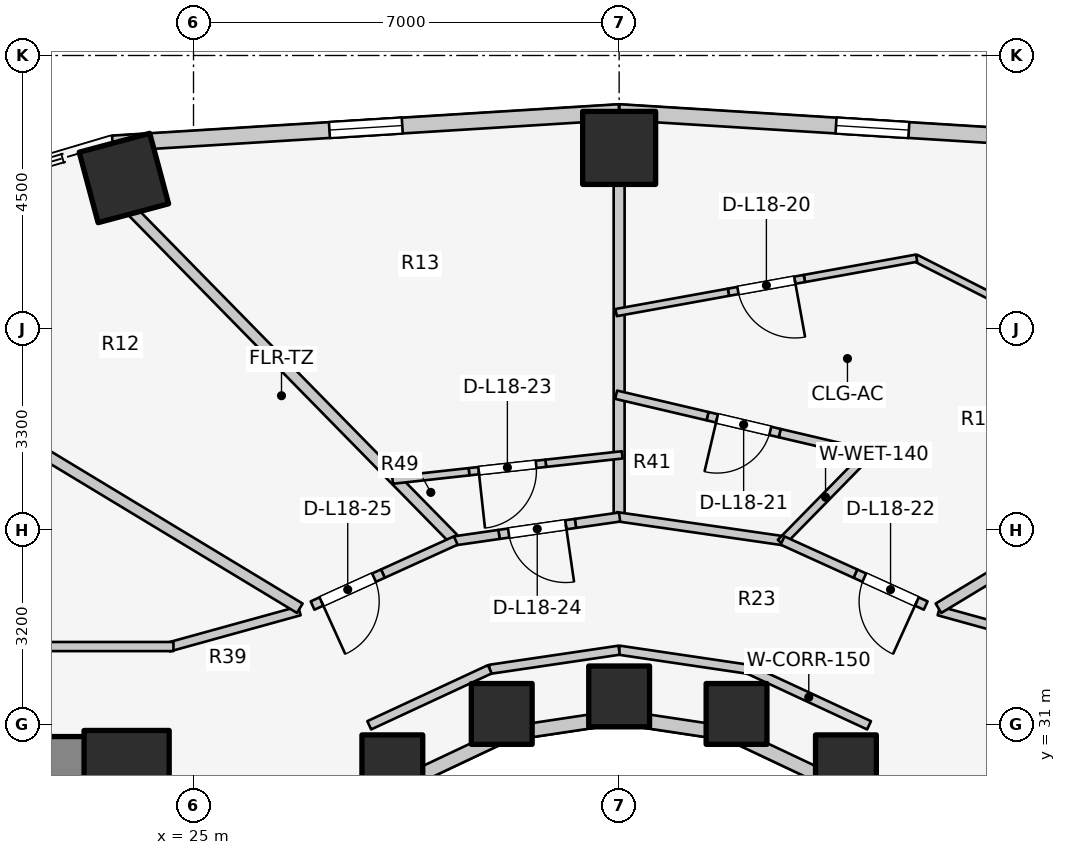
"""IFC4 building model, lengths in metres.
Left out: names, types, materials, properties, quantities, classifications, styles, units other than length and angle.
Written with IfcOpenShell. Run it as: python <this file> out.ifc"""

import sys

from ifc_helpers import new_model, si_unit, direction, frame, frame_2d, origin, origin_2d, place, context, subcontext, project, spatial, rectangle, extrude, element, fill, save


model = new_model("IFC4")
c1 = context("Model", 3, precision=1e-05, world=origin(), true_north=direction((0.0, 1.0)))
c2 = subcontext(c1, "Body", "Model", "MODEL_VIEW")
j1 = project(units=[si_unit("LENGTHUNIT", "METRE"), si_unit("PLANEANGLEUNIT", "RADIAN")], contexts=[c1])
p1 = place(None, origin())
s1 = spatial("IfcSite", under=j1, at=p1, CompositionType="ELEMENT")
p2 = place(p1, origin())
s2 = spatial("IfcBuilding", under=s1, at=p2, CompositionType="ELEMENT")
p3 = place(p2, frame((0.0, 0.0, 61.7)))
s3 = spatial("IfcBuildingStorey", under=s2, at=p3, CompositionType="ELEMENT", Elevation=61.7)
p4 = place(p3, frame((19.65, 30.35, 0.0), z_axis=(0.0, 0.0, 1.0), x_axis=(1.0, 0.0, 0.0)))
e1 = element("IfcWall", 1, at=p4, inside=s3, PredefinedType="SHEAR", context=c2, shape_type="SweptSolid", body=[
    extrude(rectangle(XDim=4.5, YDim=0.9, at=frame_2d((2.25, 0.0))), origin(), (0.0, 0.0, 1.0), 3.1),
])
p5 = place(p3, frame((23.9, 30.2, 0.0), z_axis=(0.0, 0.0, 1.0), x_axis=(1.0, 0.0, 0.0)))
e2 = element("IfcColumn", 2, at=p5, inside=s3, PredefinedType="COLUMN", context=c2, shape_type="SweptSolid", body=[
    extrude(rectangle(XDim=1.4, YDim=1.4, at=origin_2d()), origin(), (0.0, 0.0, 1.0), 3.1),
])
for number, where, z_axis, x_axis in (
    (3, (35.73, 30.327, 0.0), (0.0, 0.0, 1.0), (1.0, 0.0, 0.0)),
    (4, (33.931, 31.172, 0.0), (0.0, 0.0, 1.0), (1.0, 0.0, 0.0)),
    (5, (32.0, 31.46, 0.0), (0.0, 0.0, 1.0), (1.0, 0.0, 0.0)),
):
    element("IfcColumn", number, at=place(p3, frame(where, z_axis=z_axis, x_axis=x_axis)), inside=s3, PredefinedType="COLUMN", context=c2, shape_type="SweptSolid", body=[
        extrude(rectangle(XDim=1.0, YDim=1.0, at=origin_2d()), origin(), (0.0, 0.0, 1.0), 3.1),
    ])
p6 = place(p3, frame((32.0, 40.48, 0.0), z_axis=(0.0, 0.0, 1.0), x_axis=(0.0, 1.0, 0.0)))
e6 = element("IfcColumn", 6, at=p6, inside=s3, PredefinedType="COLUMN", context=c2, shape_type="SweptSolid", body=[
    extrude(rectangle(XDim=1.2, YDim=1.2, at=origin_2d()), origin(), (0.0, 0.0, 1.0), 3.1),
])
p7 = place(p3, frame((30.069, 31.172, 0.0), z_axis=(0.0, 0.0, 1.0), x_axis=(1.0, 0.0, 0.0)))
e7 = element("IfcColumn", 7, at=p7, inside=s3, PredefinedType="COLUMN", context=c2, shape_type="SweptSolid", body=[
    extrude(rectangle(XDim=1.0, YDim=1.0, at=origin_2d()), origin(), (0.0, 0.0, 1.0), 3.1),
])
p8 = place(p3, frame((23.855, 39.986, 0.0), z_axis=(0.0, 0.0, 1.0), x_axis=(-0.258819045103, 0.965925826289, 0.0)))
e8 = element("IfcColumn", 8, at=p8, inside=s3, PredefinedType="COLUMN", context=c2, shape_type="SweptSolid", body=[
    extrude(rectangle(XDim=1.2, YDim=1.2, at=origin_2d()), origin(), (0.0, 0.0, 1.0), 3.1),
])
p9 = place(p3, frame((28.27, 30.327, 0.0), z_axis=(0.0, 0.0, 1.0), x_axis=(1.0, 0.0, 0.0)))
e9 = element("IfcColumn", 9, at=p9, inside=s3, PredefinedType="COLUMN", context=c2, shape_type="SweptSolid", body=[
    extrude(rectangle(XDim=1.0, YDim=1.0, at=origin_2d()), origin(), (0.0, 0.0, 1.0), 3.1),
])
p10 = place(p3, frame((35.56, 30.032, 0.0), z_axis=(0.0, 0.0, 1.0), x_axis=(-0.904179699603, 0.427152280606, 0.0)))
e10 = element("IfcWall", 10, at=p10, inside=s3, PredefinedType="STANDARD", context=c2, shape_type="SweptSolid", body=[
    extrude(rectangle(XDim=1.899, YDim=0.23, at=frame_2d((0.95, 0.0))), origin(), (0.0, 0.0, 1.0), 1.22),
])
for number, where, z_axis, x_axis in (
    (11, (33.843, 30.843, 0.0), (0.0, 0.0, 1.0), (-0.989, 0.149, 0.0)),
    (12, (32.0, 31.12, 0.0), (0.0, 0.0, 1.0), (-0.989, -0.149, 0.0)),
):
    element("IfcWall", number, at=place(p3, frame(where, z_axis=z_axis, x_axis=x_axis)), inside=s3, PredefinedType="STANDARD", context=c2, shape_type="SweptSolid", body=[
        extrude(rectangle(XDim=1.864, YDim=0.23, at=frame_2d((0.932, 0.0))), origin(), (0.0, 0.0, 1.0), 1.22),
    ])
p11 = place(p3, frame((30.157, 30.843, 0.0), z_axis=(0.0, 0.0, 1.0), x_axis=(-0.904179699603, -0.427152280606, 0.0)))
e13 = element("IfcWall", 13, at=p11, inside=s3, PredefinedType="STANDARD", context=c2, shape_type="SweptSolid", body=[
    extrude(rectangle(XDim=1.899, YDim=0.23, at=frame_2d((0.95, 0.0))), origin(), (0.0, 0.0, 1.0), 1.22),
])
p12 = place(p3, frame((40.332, 40.553, 0.0), z_axis=(0.0, 0.0, 1.0), x_axis=(-0.998090514779, 0.061768311519, 0.0)))
e14 = element("IfcWall", 14, at=p12, inside=s3, PredefinedType="STANDARD", context=c2, shape_type="SweptSolid", body=[
    extrude(rectangle(XDim=8.348, YDim=0.26, at=frame_2d((4.174, 0.0))), origin(), (0.0, 0.0, 1.0), 1.22),
])
p13 = place(p12, frame((3.574, 0.0, 0.15)))
e15 = element("IfcOpeningElement", 15, at=p13, cuts=e14, PredefinedType="OPENING", context=c2, shape_type="SweptSolid", body=[
    extrude(rectangle(XDim=1.2, YDim=0.9, at=frame_2d((0.6, 0.45))), frame((0.0, 0.14, 0.0), z_axis=(0.0, -1.0, 0.0), x_axis=(1.0, 0.0, 0.0)), (0.0, 0.0, 1.0), 0.28),
])
p14 = place(p3, frame((32.0, 41.069, 0.0), z_axis=(0.0, 0.0, 1.0), x_axis=(-0.998090514779, -0.061768311519, 0.0)))
e16 = element("IfcWall", 16, at=p14, inside=s3, PredefinedType="STANDARD", context=c2, shape_type="SweptSolid", body=[
    extrude(rectangle(XDim=8.348, YDim=0.26, at=frame_2d((4.174, 0.0))), origin(), (0.0, 0.0, 1.0), 1.22),
])
p15 = place(p14, frame((3.574, 0.0, 0.15)))
e17 = element("IfcOpeningElement", 17, at=p15, cuts=e16, PredefinedType="OPENING", context=c2, shape_type="SweptSolid", body=[
    extrude(rectangle(XDim=1.2, YDim=0.9, at=frame_2d((0.6, 0.45))), frame((0.0, 0.14, 0.0), z_axis=(0.0, -1.0, 0.0), x_axis=(1.0, 0.0, 0.0)), (0.0, 0.0, 1.0), 0.28),
])
p16 = place(p3, frame((36.11, 30.985, 0.0), z_axis=(0.0, 0.0, 1.0), x_axis=(-0.906943449489, 0.421252393975, 0.0)))
e18 = element("IfcWall", 18, at=p16, inside=s3, PredefinedType="PARTITIONING", context=c2, shape_type="SweptSolid", body=[
    extrude(rectangle(XDim=2.186, YDim=0.15, at=frame_2d((1.093, 0.0))), origin(), (0.0, 0.0, 1.0), 1.22),
])
for number, where, z_axis, x_axis in (
    (19, (34.127, 31.906, 0.0), (0.0, 0.0, 1.0), (-0.989, 0.146, 0.0)),
    (20, (32.0, 32.22, 0.0), (0.0, 0.0, 1.0), (-0.989, -0.146, 0.0)),
):
    element("IfcWall", number, at=place(p3, frame(where, z_axis=z_axis, x_axis=x_axis)), inside=s3, PredefinedType="PARTITIONING", context=c2, shape_type="SweptSolid", body=[
        extrude(rectangle(XDim=2.151, YDim=0.15, at=frame_2d((1.075, 0.0))), origin(), (0.0, 0.0, 1.0), 1.22),
    ])
p17 = place(p3, frame((29.873, 31.906, 0.0), z_axis=(0.0, 0.0, 1.0), x_axis=(-0.906943449489, -0.421252393975, 0.0)))
e21 = element("IfcWall", 21, at=p17, inside=s3, PredefinedType="PARTITIONING", context=c2, shape_type="SweptSolid", body=[
    extrude(rectangle(XDim=2.186, YDim=0.15, at=frame_2d((1.093, 0.0))), origin(), (0.0, 0.0, 1.0), 1.22),
])
for number, where, z_axis, x_axis in (
    (22, (37.258, 32.867, 0.0), (0.0, 0.0, 1.0), (0.964, -0.267, 0.0)),
    (23, (26.742, 32.867, 0.0), (0.0, 0.0, 1.0), (-0.964, -0.267, 0.0)),
):
    element("IfcWall", number, at=place(p3, frame(where, z_axis=z_axis, x_axis=x_axis)), inside=s3, PredefinedType="PARTITIONING", context=c2, shape_type="SweptSolid", body=[
        extrude(rectangle(XDim=2.232, YDim=0.15, at=frame_2d((1.116, 0.0))), origin(), (0.0, 0.0, 1.0), 1.22),
    ])
p18 = place(p3, frame((19.51, 32.28, 0.0), z_axis=(0.0, 0.0, 1.0), x_axis=(1.0, 0.0, 0.0)))
e24 = element("IfcWall", 24, at=p18, inside=s3, PredefinedType="PARTITIONING", context=c2, shape_type="SweptSolid", body=[
    extrude(rectangle(XDim=5.16, YDim=0.15, at=frame_2d((2.58, 0.0))), origin(), (0.0, 0.0, 1.0), 1.22),
])
p19 = place(p3, frame((37.252, 32.91, 0.0), z_axis=(0.0, 0.0, 1.0), x_axis=(0.855817136021, 0.517278483694, 0.0)))
e25 = element("IfcWall", 25, at=p19, inside=s3, PredefinedType="PARTITIONING", context=c2, shape_type="SweptSolid", body=[
    extrude(rectangle(XDim=9.564, YDim=0.18, at=frame_2d((4.782, 0.0))), origin(), (0.0, 0.0, 1.0), 1.22),
])
p20 = place(p3, frame((32.0, 34.465, 0.0), z_axis=(0.0, 0.0, 1.0), x_axis=(0.0, 1.0, 0.0)))
e26 = element("IfcWall", 26, at=p20, inside=s3, PredefinedType="PARTITIONING", context=c2, shape_type="SweptSolid", body=[
    extrude(rectangle(XDim=5.435, YDim=0.18, at=frame_2d((2.717, 0.0))), origin(), (0.0, 0.0, 1.0), 1.22),
])
p21 = place(p3, frame((29.267, 34.061, 0.0), z_axis=(0.0, 0.0, 1.0), x_axis=(-0.700234780085, 0.713912636644, 0.0)))
e27 = element("IfcWall", 27, at=p21, inside=s3, PredefinedType="PARTITIONING", context=c2, shape_type="SweptSolid", body=[
    extrude(rectangle(XDim=7.515, YDim=0.18, at=frame_2d((3.757, 0.0))), origin(), (0.0, 0.0, 1.0), 1.22),
])
p22 = place(p3, frame((26.748, 32.91, 0.0), z_axis=(0.0, 0.0, 1.0), x_axis=(-0.855817136021, 0.517278483694, 0.0)))
e28 = element("IfcWall", 28, at=p22, inside=s3, PredefinedType="PARTITIONING", context=c2, shape_type="SweptSolid", body=[
    extrude(rectangle(XDim=9.564, YDim=0.18, at=frame_2d((4.782, 0.0))), origin(), (0.0, 0.0, 1.0), 1.22),
])
p23 = place(p3, frame((42.305, 35.914, 0.0), z_axis=(0.0, 0.0, 1.0), x_axis=(-0.891749407737, 0.452529550195, 0.0)))
e29 = element("IfcWall", 29, at=p23, inside=s3, PredefinedType="MOVABLE", context=c2, shape_type="SweptSolid", body=[
    extrude(rectangle(XDim=6.09, YDim=0.12, at=frame_2d((3.045, 0.0))), origin(), (0.0, 0.0, 1.0), 1.22),
])
p24 = place(p3, frame((36.893, 38.667, 0.0), z_axis=(0.0, 0.0, 1.0), x_axis=(-0.984000828306, -0.178163884929, 0.0)))
e30 = element("IfcWall", 30, at=p24, inside=s3, PredefinedType="MOVABLE", context=c2, shape_type="SweptSolid", body=[
    extrude(rectangle(XDim=1.876, YDim=0.12, at=frame_2d((0.938, 0.0))), origin(), (0.0, 0.0, 1.0), 2.575),
])
p25 = place(p3, frame((35.047, 38.333, 0.0), z_axis=(0.0, 0.0, 1.0), x_axis=(-0.983955925846, -0.178411703631, 0.0)))
e31 = element("IfcWall", 31, at=p25, inside=s3, PredefinedType="MOVABLE", context=c2, shape_type="SweptSolid", body=[
    extrude(rectangle(XDim=1.27, YDim=0.12, at=frame_2d((0.635, 0.0))), origin(), (0.0, 0.0, 1.0), 2.575),
])
p26 = place(p25, frame((0.16, 0.0, 0.0)))
e32 = element("IfcOpeningElement", 32, at=p26, cuts=e31, PredefinedType="OPENING", context=c2, shape_type="SweptSolid", body=[
    extrude(rectangle(XDim=0.95, YDim=2.1, at=frame_2d((0.475, 1.05))), frame((0.0, 0.07, 0.0), z_axis=(0.0, -1.0, 0.0), x_axis=(1.0, 0.0, 0.0)), (0.0, 0.0, 1.0), 0.14),
])
p27 = place(p3, frame((33.797, 38.106, 0.0), z_axis=(0.0, 0.0, 1.0), x_axis=(-0.98400908714, -0.178118265278, 0.0)))
e33 = element("IfcWall", 33, at=p27, inside=s3, PredefinedType="MOVABLE", context=c2, shape_type="SweptSolid", body=[
    extrude(rectangle(XDim=1.876, YDim=0.12, at=frame_2d((0.938, 0.0))), origin(), (0.0, 0.0, 1.0), 1.22),
])
p28 = place(p3, frame((34.744, 34.014, 0.0), z_axis=(0.0, 0.0, 1.0), x_axis=(-0.989761784218, 0.142729150844, 0.0)))
e34 = element("IfcWall", 34, at=p28, inside=s3, PredefinedType="PARTITIONING", context=c2, shape_type="SweptSolid", body=[
    extrude(rectangle(XDim=2.822, YDim=0.15, at=frame_2d((1.411, 0.0))), origin(), (0.0, 0.0, 1.0), 1.22),
])
p29 = place(p3, frame((34.659, 33.986, 0.0), z_axis=(0.0, 0.0, 1.0), x_axis=(0.700331728855, 0.713817532398, 0.0)))
e35 = element("IfcWall", 35, at=p29, inside=s3, PredefinedType="PLUMBINGWALL", context=c2, shape_type="SweptSolid", body=[
    extrude(rectangle(XDim=2.1, YDim=0.14, at=frame_2d((1.05, 0.0))), origin(), (0.0, 0.0, 1.0), 2.105),
])
p30 = place(p3, frame((36.144, 35.438, 0.0), z_axis=(0.0, 0.0, 1.0), x_axis=(-0.973549808771, 0.228474877924, 0.0)))
e36 = element("IfcWall", 36, at=p30, inside=s3, PredefinedType="PLUMBINGWALL", context=c2, shape_type="SweptSolid", body=[
    extrude(rectangle(XDim=1.543, YDim=0.14, at=frame_2d((0.771, 0.0))), origin(), (0.0, 0.0, 1.0), 2.105),
])
p31 = place(p3, frame((34.641, 35.79, 0.0), z_axis=(0.0, 0.0, 1.0), x_axis=(-0.97353775554, 0.228526231619, 0.0)))
e37 = element("IfcWall", 37, at=p31, inside=s3, PredefinedType="PLUMBINGWALL", context=c2, shape_type="SweptSolid", body=[
    extrude(rectangle(XDim=1.22, YDim=0.14, at=frame_2d((0.61, 0.0))), origin(), (0.0, 0.0, 1.0), 2.16),
])
p32 = place(p31, frame((0.16, 0.0, 0.0)))
e38 = element("IfcOpeningElement", 38, at=p32, cuts=e37, PredefinedType="OPENING", context=c2, shape_type="SweptSolid", body=[
    extrude(rectangle(XDim=0.9, YDim=2.1, at=frame_2d((0.45, 1.05))), frame((0.0, 0.08, 0.0), z_axis=(0.0, -1.0, 0.0), x_axis=(1.0, 0.0, 0.0)), (0.0, 0.0, 1.0), 0.16),
])
p33 = place(p3, frame((33.454, 36.069, 0.0), z_axis=(0.0, 0.0, 1.0), x_axis=(-0.973549808771, 0.228474877924, 0.0)))
e39 = element("IfcWall", 39, at=p33, inside=s3, PredefinedType="PLUMBINGWALL", context=c2, shape_type="SweptSolid", body=[
    extrude(rectangle(XDim=1.543, YDim=0.14, at=frame_2d((0.771, 0.0))), origin(), (0.0, 0.0, 1.0), 1.22),
])
p34 = place(p3, frame((37.042, 32.954, 0.0), z_axis=(0.0, 0.0, 1.0), x_axis=(-0.910596749825, 0.413295970472, 0.0)))
e40 = element("IfcWall", 40, at=p34, inside=s3, PredefinedType="PARTITIONING", context=c2, shape_type="SweptSolid", body=[
    extrude(rectangle(XDim=1.27, YDim=0.15, at=frame_2d((0.635, 0.0))), origin(), (0.0, 0.0, 1.0), 2.16),
])
p35 = place(p34, frame((0.16, 0.0, 0.0)))
e41 = element("IfcOpeningElement", 41, at=p35, cuts=e40, PredefinedType="OPENING", context=c2, shape_type="SweptSolid", body=[
    extrude(rectangle(XDim=0.95, YDim=2.1, at=frame_2d((0.475, 1.05))), frame((0.0, 0.085, 0.0), z_axis=(0.0, -1.0, 0.0), x_axis=(1.0, 0.0, 0.0)), (0.0, 0.0, 1.0), 0.17),
])
p36 = place(p3, frame((35.885, 33.479, 0.0), z_axis=(0.0, 0.0, 1.0), x_axis=(-0.910569685542, 0.413355594822, 0.0)))
e42 = element("IfcWall", 42, at=p36, inside=s3, PredefinedType="PARTITIONING", context=c2, shape_type="SweptSolid", body=[
    extrude(rectangle(XDim=1.316, YDim=0.15, at=frame_2d((0.658, 0.0))), origin(), (0.0, 0.0, 1.0), 1.22),
])
p37 = place(p3, frame((32.05, 35.432, 0.0), z_axis=(0.0, 0.0, 1.0), x_axis=(-0.993986922288, -0.109498850775, 0.0)))
e43 = element("IfcWall", 43, at=p37, inside=s3, PredefinedType="MOVABLE", context=c2, shape_type="SweptSolid", body=[
    extrude(rectangle(XDim=1.264, YDim=0.12, at=frame_2d((0.632, 0.0))), origin(), (0.0, 0.0, 1.0), 1.22),
])
p38 = place(p3, frame((30.793, 35.294, 0.0), z_axis=(0.0, 0.0, 1.0), x_axis=(-0.994000385789, -0.109376565367, 0.0)))
e44 = element("IfcWall", 44, at=p38, inside=s3, PredefinedType="MOVABLE", context=c2, shape_type="SweptSolid", body=[
    extrude(rectangle(XDim=1.27, YDim=0.12, at=frame_2d((0.635, 0.0))), origin(), (0.0, 0.0, 1.0), 2.575),
])
p39 = place(p38, frame((0.16, 0.0, 0.0)))
e45 = element("IfcOpeningElement", 45, at=p39, cuts=e44, PredefinedType="OPENING", context=c2, shape_type="SweptSolid", body=[
    extrude(rectangle(XDim=0.95, YDim=2.1, at=frame_2d((0.475, 1.05))), frame((0.0, 0.07, 0.0), z_axis=(0.0, -1.0, 0.0), x_axis=(1.0, 0.0, 0.0)), (0.0, 0.0, 1.0), 0.14),
])
p40 = place(p3, frame((29.531, 35.155, 0.0), z_axis=(0.0, 0.0, 1.0), x_axis=(-0.99400561549, -0.109329028054, 0.0)))
e46 = element("IfcWall", 46, at=p40, inside=s3, PredefinedType="MOVABLE", context=c2, shape_type="SweptSolid", body=[
    extrude(rectangle(XDim=1.264, YDim=0.12, at=frame_2d((0.632, 0.0))), origin(), (0.0, 0.0, 1.0), 2.575),
])
p41 = place(p3, frame((32.007, 34.41, 0.0), z_axis=(0.0, 0.0, 1.0), x_axis=(-0.989795766197, -0.142493302365, 0.0)))
e47 = element("IfcWall", 47, at=p41, inside=s3, PredefinedType="PARTITIONING", context=c2, shape_type="SweptSolid", body=[
    extrude(rectangle(XDim=0.733, YDim=0.15, at=frame_2d((0.367, 0.0))), origin(), (0.0, 0.0, 1.0), 1.22),
])
p42 = place(p3, frame((31.281, 34.305, 0.0), z_axis=(0.0, 0.0, 1.0), x_axis=(-0.989721405299, -0.14300888047, 0.0)))
e48 = element("IfcWall", 48, at=p42, inside=s3, PredefinedType="PARTITIONING", context=c2, shape_type="SweptSolid", body=[
    extrude(rectangle(XDim=1.27, YDim=0.15, at=frame_2d((0.635, 0.0))), origin(), (0.0, 0.0, 1.0), 2.575),
])
p43 = place(p42, frame((0.16, 0.0, 0.0)))
e49 = element("IfcOpeningElement", 49, at=p43, cuts=e48, PredefinedType="OPENING", context=c2, shape_type="SweptSolid", body=[
    extrude(rectangle(XDim=0.95, YDim=2.1, at=frame_2d((0.475, 1.05))), frame((0.0, 0.085, 0.0), z_axis=(0.0, -1.0, 0.0), x_axis=(1.0, 0.0, 0.0)), (0.0, 0.0, 1.0), 0.17),
])
p44 = place(p3, frame((30.024, 34.124, 0.0), z_axis=(0.0, 0.0, 1.0), x_axis=(-0.98974875873, -0.142819447526, 0.0)))
e50 = element("IfcWall", 50, at=p44, inside=s3, PredefinedType="PARTITIONING", context=c2, shape_type="SweptSolid", body=[
    extrude(rectangle(XDim=0.733, YDim=0.15, at=frame_2d((0.367, 0.0))), origin(), (0.0, 0.0, 1.0), 2.575),
])
p45 = place(p3, frame((29.313, 34.023, 0.0), z_axis=(0.0, 0.0, 1.0), x_axis=(-0.910569685542, -0.413355594822, 0.0)))
e51 = element("IfcWall", 51, at=p45, inside=s3, PredefinedType="PARTITIONING", context=c2, shape_type="SweptSolid", body=[
    extrude(rectangle(XDim=1.316, YDim=0.15, at=frame_2d((0.658, 0.0))), origin(), (0.0, 0.0, 1.0), 1.22),
])
p46 = place(p3, frame((28.115, 33.479, 0.0), z_axis=(0.0, 0.0, 1.0), x_axis=(-0.910596749825, -0.413295970472, 0.0)))
e52 = element("IfcWall", 52, at=p46, inside=s3, PredefinedType="PARTITIONING", context=c2, shape_type="SweptSolid", body=[
    extrude(rectangle(XDim=1.27, YDim=0.15, at=frame_2d((0.635, 0.0))), origin(), (0.0, 0.0, 1.0), 2.16),
])
p47 = place(p46, frame((0.16, 0.0, 0.0)))
e53 = element("IfcOpeningElement", 53, at=p47, cuts=e52, PredefinedType="OPENING", context=c2, shape_type="SweptSolid", body=[
    extrude(rectangle(XDim=0.95, YDim=2.1, at=frame_2d((0.475, 1.05))), frame((0.0, 0.085, 0.0), z_axis=(0.0, -1.0, 0.0), x_axis=(1.0, 0.0, 0.0)), (0.0, 0.0, 1.0), 0.17),
])
p48 = place(p13, origin())
e54 = element("IfcWindow", 54, at=p48, inside=s3, PartitioningType="SINGLE_PANEL", PredefinedType="WINDOW", context=c2, shape_type="SweptSolid", body=[
    extrude(rectangle(XDim=1.2, YDim=0.9, at=frame_2d((0.6, 0.45))), frame((0.0, 0.03, 0.0), z_axis=(0.0, -1.0, 0.0), x_axis=(1.0, 0.0, 0.0)), (0.0, 0.0, 1.0), 0.06),
])
fill(e15, e54)
p49 = place(p15, origin())
e55 = element("IfcWindow", 55, at=p49, inside=s3, PartitioningType="SINGLE_PANEL", PredefinedType="WINDOW", context=c2, shape_type="SweptSolid", body=[
    extrude(rectangle(XDim=1.2, YDim=0.9, at=frame_2d((0.6, 0.45))), frame((0.0, 0.03, 0.0), z_axis=(0.0, -1.0, 0.0), x_axis=(1.0, 0.0, 0.0)), (0.0, 0.0, 1.0), 0.06),
])
fill(e17, e55)
p50 = place(p26, origin())
e56 = element("IfcDoor", 56, at=p50, inside=s3, OperationType="SINGLE_SWING_LEFT", PredefinedType="DOOR", context=c2, shape_type="SweptSolid", body=[
    extrude(rectangle(XDim=0.95, YDim=2.1, at=frame_2d((0.475, 1.05))), frame((0.0, 0.025, 0.0), z_axis=(0.0, -1.0, 0.0), x_axis=(1.0, 0.0, 0.0)), (0.0, 0.0, 1.0), 0.05),
])
fill(e32, e56)
p51 = place(p32, origin())
e57 = element("IfcDoor", 57, at=p51, inside=s3, OperationType="SINGLE_SWING_RIGHT", PredefinedType="DOOR", context=c2, shape_type="SweptSolid", body=[
    extrude(rectangle(XDim=0.9, YDim=2.1, at=frame_2d((0.45, 1.05))), frame((0.0, 0.025, 0.0), z_axis=(0.0, -1.0, 0.0), x_axis=(1.0, 0.0, 0.0)), (0.0, 0.0, 1.0), 0.05),
])
fill(e38, e57)
p52 = place(p35, origin())
e58 = element("IfcDoor", 58, at=p52, inside=s3, OperationType="SINGLE_SWING_LEFT", PredefinedType="DOOR", context=c2, shape_type="SweptSolid", body=[
    extrude(rectangle(XDim=0.95, YDim=2.1, at=frame_2d((0.475, 1.05))), frame((0.0, 0.025, 0.0), z_axis=(0.0, -1.0, 0.0), x_axis=(1.0, 0.0, 0.0)), (0.0, 0.0, 1.0), 0.05),
])
fill(e41, e58)
p53 = place(p39, origin())
e59 = element("IfcDoor", 59, at=p53, inside=s3, OperationType="SINGLE_SWING_RIGHT", PredefinedType="DOOR", context=c2, shape_type="SweptSolid", body=[
    extrude(rectangle(XDim=0.95, YDim=2.1, at=frame_2d((0.475, 1.05))), frame((0.0, 0.025, 0.0), z_axis=(0.0, -1.0, 0.0), x_axis=(1.0, 0.0, 0.0)), (0.0, 0.0, 1.0), 0.05),
])
fill(e45, e59)
p54 = place(p43, origin())
e60 = element("IfcDoor", 60, at=p54, inside=s3, OperationType="SINGLE_SWING_LEFT", PredefinedType="DOOR", context=c2, shape_type="SweptSolid", body=[
    extrude(rectangle(XDim=0.95, YDim=2.1, at=frame_2d((0.475, 1.05))), frame((0.0, 0.025, 0.0), z_axis=(0.0, -1.0, 0.0), x_axis=(1.0, 0.0, 0.0)), (0.0, 0.0, 1.0), 0.05),
])
fill(e49, e60)
p55 = place(p47, origin())
e61 = element("IfcDoor", 61, at=p55, inside=s3, OperationType="SINGLE_SWING_RIGHT", PredefinedType="DOOR", context=c2, shape_type="SweptSolid", body=[
    extrude(rectangle(XDim=0.95, YDim=2.1, at=frame_2d((0.475, 1.05))), frame((0.0, 0.025, 0.0), z_axis=(0.0, -1.0, 0.0), x_axis=(1.0, 0.0, 0.0)), (0.0, 0.0, 1.0), 0.05),
])
fill(e53, e61)
save(model, sys.argv[1])
